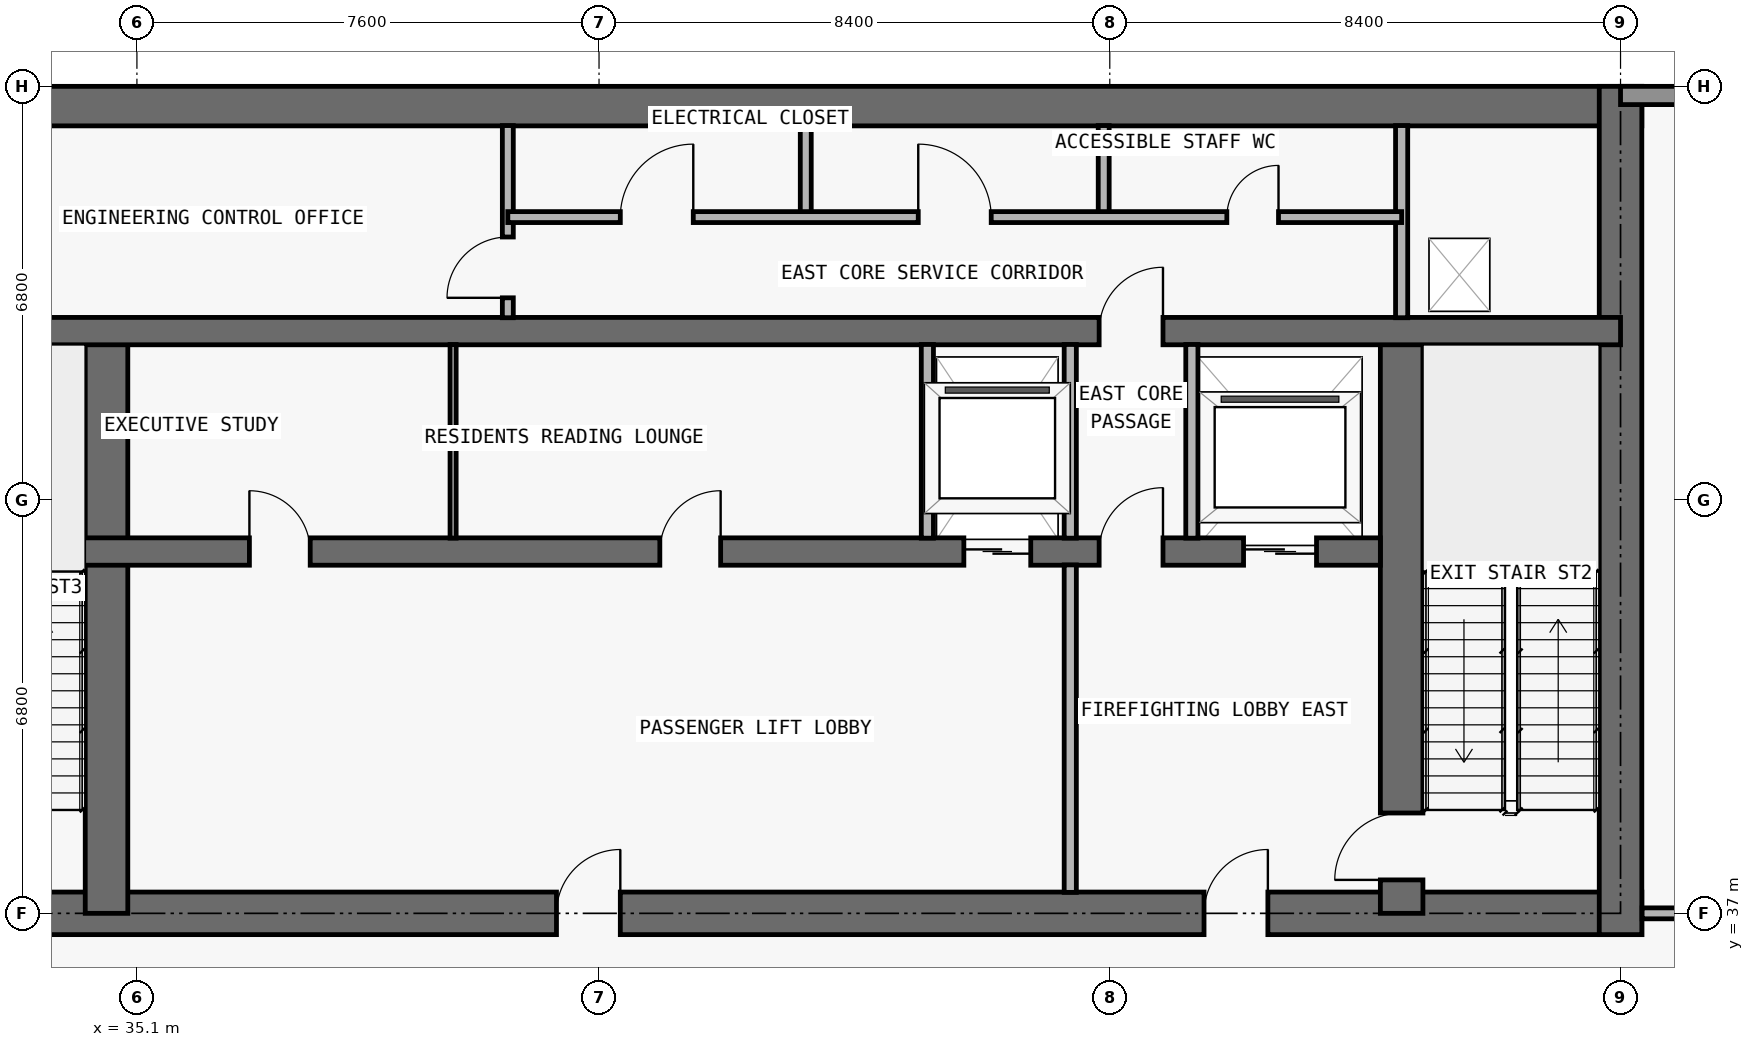
"""IFC4 building model, lengths in metres.
Left out: names, types, materials, properties, quantities, classifications, styles, units other than length and angle.
Written with IfcOpenShell. Run it as: python <this file> out.ifc"""

import sys

from ifc_helpers import new_model, si_unit, direction, frame, frame_2d, origin, place, context, subcontext, project, spatial, rectangle, extrude, element, fill, save


model = new_model("IFC4")
c1 = context("Model", 3, precision=1e-05, world=origin(), true_north=direction((0.0, 1.0)))
c2 = subcontext(c1, "Body", "Model", "MODEL_VIEW")
j1 = project(units=[si_unit("LENGTHUNIT", "METRE"), si_unit("PLANEANGLEUNIT", "RADIAN")], contexts=[c1])
p1 = place(None, origin())
s1 = spatial("IfcSite", under=j1, at=p1, CompositionType="ELEMENT")
p2 = place(p1, origin())
s2 = spatial("IfcBuilding", under=s1, at=p2, CompositionType="ELEMENT")
p3 = place(p2, frame((0.0, 0.0, 221.4)))
s3 = spatial("IfcBuildingStorey", under=s2, at=p3, CompositionType="ELEMENT", Elevation=221.4)
p4 = place(p3, frame((17.95, 37.0, 0.0), z_axis=(0.0, 0.0, 1.0), x_axis=(1.0, 0.0, 0.0)))
e1 = element("IfcWall", 1, at=p4, inside=s3, PredefinedType="SHEAR", context=c2, shape_type="SweptSolid", body=[
    extrude(rectangle(XDim=41.9, YDim=0.7, at=frame_2d((20.95, 0.0))), origin(), (0.0, 0.0, 1.0), 4.85),
])
p5 = place(p4, frame((14.35, 0.0, 0.0)))
e2 = element("IfcOpeningElement", 2, at=p5, cuts=e1, PredefinedType="OPENING", context=c2, shape_type="SweptSolid", body=[
    extrude(rectangle(XDim=1.1, YDim=2.15, at=frame_2d((0.55, 1.075))), frame((0.0, 0.36, 0.0), z_axis=(0.0, -1.0, 0.0), x_axis=(1.0, 0.0, 0.0)), (0.0, 0.0, 1.0), 0.72),
])
p6 = place(p4, frame((6.2, 0.0, 0.0)))
e3 = element("IfcOpeningElement", 3, at=p6, cuts=e1, PredefinedType="OPENING", context=c2, shape_type="SweptSolid", body=[
    extrude(rectangle(XDim=1.05, YDim=2.15, at=frame_2d((0.525, 1.075))), frame((0.0, 0.36, 0.0), z_axis=(0.0, -1.0, 0.0), x_axis=(1.0, 0.0, 0.0)), (0.0, 0.0, 1.0), 0.72),
])
p7 = place(p4, frame((34.7, 0.0, 0.0)))
e4 = element("IfcOpeningElement", 4, at=p7, cuts=e1, PredefinedType="OPENING", context=c2, shape_type="SweptSolid", body=[
    extrude(rectangle(XDim=1.05, YDim=2.15, at=frame_2d((0.525, 1.075))), frame((0.0, 0.36, 0.0), z_axis=(0.0, -1.0, 0.0), x_axis=(1.0, 0.0, 0.0)), (0.0, 0.0, 1.0), 0.72),
])
p8 = place(p4, frame((10.812, 0.0, 0.0)))
e5 = element("IfcOpeningElement", 5, at=p8, cuts=e1, PredefinedType="OPENING", context=c2, shape_type="SweptSolid", body=[
    extrude(rectangle(XDim=1.05, YDim=2.15, at=frame_2d((0.525, 1.075))), frame((0.0, 0.36, 0.0), z_axis=(0.0, -1.0, 0.0), x_axis=(1.0, 0.0, 0.0)), (0.0, 0.0, 1.0), 0.72),
])
p9 = place(p4, frame((24.05, 0.0, 0.0)))
e6 = element("IfcOpeningElement", 6, at=p9, cuts=e1, PredefinedType="OPENING", context=c2, shape_type="SweptSolid", body=[
    extrude(rectangle(XDim=1.05, YDim=2.15, at=frame_2d((0.525, 1.075))), frame((0.0, 0.36, 0.0), z_axis=(0.0, -1.0, 0.0), x_axis=(1.0, 0.0, 0.0)), (0.0, 0.0, 1.0), 0.72),
])
p10 = place(p3, frame((17.95, 50.275, 0.0), z_axis=(0.0, 0.0, 1.0), x_axis=(1.0, 0.0, 0.0)))
e7 = element("IfcWall", 7, at=p10, inside=s3, PredefinedType="SHEAR", context=c2, shape_type="SweptSolid", body=[
    extrude(rectangle(XDim=41.9, YDim=0.65, at=frame_2d((20.95, 0.0))), origin(), (0.0, 0.0, 1.0), 4.85),
])
p11 = place(p3, frame((59.5, 36.65, 0.0), z_axis=(0.0, 0.0, 1.0), x_axis=(0.0, 1.0, 0.0)))
e8 = element("IfcWall", 8, at=p11, inside=s3, PredefinedType="SHEAR", context=c2, shape_type="SweptSolid", body=[
    extrude(rectangle(XDim=13.95, YDim=0.7, at=frame_2d((6.975, 0.0))), origin(), (0.0, 0.0, 1.0), 4.85),
])
p12 = place(p3, frame((55.9, 37.0, 0.0), z_axis=(0.0, 0.0, 1.0), x_axis=(0.0, 1.0, 0.0)))
e9 = element("IfcWall", 9, at=p12, inside=s3, PredefinedType="SHEAR", context=c2, shape_type="SweptSolid", body=[
    extrude(rectangle(XDim=9.575, YDim=0.7, at=frame_2d((4.788, 0.0))), origin(), (0.0, 0.0, 1.0), 4.85),
])
p13 = place(p12, frame((0.55, 0.0, 0.0)))
e10 = element("IfcOpeningElement", 10, at=p13, cuts=e9, PredefinedType="OPENING", context=c2, shape_type="SweptSolid", body=[
    extrude(rectangle(XDim=1.1, YDim=2.15, at=frame_2d((0.55, 1.075))), frame((0.0, 0.36, 0.0), z_axis=(0.0, -1.0, 0.0), x_axis=(1.0, 0.0, 0.0)), (0.0, 0.0, 1.0), 0.72),
])
p14 = place(p3, frame((34.6, 37.0, 0.0), z_axis=(0.0, 0.0, 1.0), x_axis=(0.0, 1.0, 0.0)))
e11 = element("IfcWall", 11, at=p14, inside=s3, PredefinedType="SHEAR", context=c2, shape_type="SweptSolid", body=[
    extrude(rectangle(XDim=9.575, YDim=0.7, at=frame_2d((4.788, 0.0))), origin(), (0.0, 0.0, 1.0), 4.85),
])
p15 = place(p3, frame((22.25, 42.95, 0.0), z_axis=(0.0, 0.0, 1.0), x_axis=(1.0, 0.0, 0.0)))
e12 = element("IfcWall", 12, at=p15, inside=s3, PredefinedType="SHEAR", context=c2, shape_type="SweptSolid", body=[
    extrude(rectangle(XDim=33.3, YDim=0.45, at=frame_2d((16.65, 0.0))), origin(), (0.0, 0.0, 1.0), 4.85),
])
p16 = place(p15, frame((1.05, 0.0, 0.0)))
e13 = element("IfcOpeningElement", 13, at=p16, cuts=e12, PredefinedType="OPENING", context=c2, shape_type="SweptSolid", body=[
    extrude(rectangle(XDim=1.2, YDim=2.2, at=frame_2d((0.6, 1.1))), frame((0.0, 0.235, 0.0), z_axis=(0.0, -1.0, 0.0), x_axis=(1.0, 0.0, 0.0)), (0.0, 0.0, 1.0), 0.47),
])
p17 = place(p15, frame((31.05, 0.0, 0.0)))
e14 = element("IfcOpeningElement", 14, at=p17, cuts=e12, PredefinedType="OPENING", context=c2, shape_type="SweptSolid", body=[
    extrude(rectangle(XDim=1.2, YDim=2.2, at=frame_2d((0.6, 1.1))), frame((0.0, 0.235, 0.0), z_axis=(0.0, -1.0, 0.0), x_axis=(1.0, 0.0, 0.0)), (0.0, 0.0, 1.0), 0.47),
])
p18 = place(p15, frame((26.45, 0.0, 0.0)))
e15 = element("IfcOpeningElement", 15, at=p18, cuts=e12, PredefinedType="OPENING", context=c2, shape_type="SweptSolid", body=[
    extrude(rectangle(XDim=1.1, YDim=2.2, at=frame_2d((0.55, 1.1))), frame((0.0, 0.235, 0.0), z_axis=(0.0, -1.0, 0.0), x_axis=(1.0, 0.0, 0.0)), (0.0, 0.0, 1.0), 0.47),
])
p19 = place(p15, frame((5.95, 0.0, 0.0)))
e16 = element("IfcOpeningElement", 16, at=p19, cuts=e12, PredefinedType="OPENING", context=c2, shape_type="SweptSolid", body=[
    extrude(rectangle(XDim=1.1, YDim=2.2, at=frame_2d((0.55, 1.1))), frame((0.0, 0.235, 0.0), z_axis=(0.0, -1.0, 0.0), x_axis=(1.0, 0.0, 0.0)), (0.0, 0.0, 1.0), 0.47),
])
p20 = place(p15, frame((3.625, 0.0, 0.0)))
e17 = element("IfcOpeningElement", 17, at=p20, cuts=e12, PredefinedType="OPENING", context=c2, shape_type="SweptSolid", body=[
    extrude(rectangle(XDim=1.05, YDim=2.15, at=frame_2d((0.525, 1.075))), frame((0.0, 0.235, 0.0), z_axis=(0.0, -1.0, 0.0), x_axis=(1.0, 0.0, 0.0)), (0.0, 0.0, 1.0), 0.47),
])
p21 = place(p15, frame((28.675, 0.0, 0.0)))
e18 = element("IfcOpeningElement", 18, at=p21, cuts=e12, PredefinedType="OPENING", context=c2, shape_type="SweptSolid", body=[
    extrude(rectangle(XDim=1.05, YDim=2.15, at=frame_2d((0.525, 1.075))), frame((0.0, 0.235, 0.0), z_axis=(0.0, -1.0, 0.0), x_axis=(1.0, 0.0, 0.0)), (0.0, 0.0, 1.0), 0.47),
])
p22 = place(p15, frame((14.7, 0.0, 0.0)))
e19 = element("IfcOpeningElement", 19, at=p22, cuts=e12, PredefinedType="OPENING", context=c2, shape_type="SweptSolid", body=[
    extrude(rectangle(XDim=1.0, YDim=2.2, at=frame_2d((0.5, 1.1))), frame((0.0, 0.235, 0.0), z_axis=(0.0, -1.0, 0.0), x_axis=(1.0, 0.0, 0.0)), (0.0, 0.0, 1.0), 0.47),
])
p23 = place(p15, frame((21.45, 0.0, 0.0)))
e20 = element("IfcOpeningElement", 20, at=p23, cuts=e12, PredefinedType="OPENING", context=c2, shape_type="SweptSolid", body=[
    extrude(rectangle(XDim=1.0, YDim=2.2, at=frame_2d((0.5, 1.1))), frame((0.0, 0.235, 0.0), z_axis=(0.0, -1.0, 0.0), x_axis=(1.0, 0.0, 0.0)), (0.0, 0.0, 1.0), 0.47),
])
p24 = place(p3, frame((18.3, 46.575, 0.0), z_axis=(0.0, 0.0, 1.0), x_axis=(1.0, 0.0, 0.0)))
e21 = element("IfcWall", 21, at=p24, inside=s3, PredefinedType="SHEAR", context=c2, shape_type="SweptSolid", body=[
    extrude(rectangle(XDim=41.2, YDim=0.45, at=frame_2d((20.6, 0.0))), origin(), (0.0, 0.0, 1.0), 4.85),
])
p25 = place(p24, frame((7.6, 0.0, 0.0)))
e22 = element("IfcOpeningElement", 22, at=p25, cuts=e21, PredefinedType="OPENING", context=c2, shape_type="SweptSolid", body=[
    extrude(rectangle(XDim=1.0, YDim=2.2, at=frame_2d((0.5, 1.1))), frame((0.0, 0.235, 0.0), z_axis=(0.0, -1.0, 0.0), x_axis=(1.0, 0.0, 0.0)), (0.0, 0.0, 1.0), 0.47),
])
p26 = place(p24, frame((32.625, 0.0, 0.0)))
e23 = element("IfcOpeningElement", 23, at=p26, cuts=e21, PredefinedType="OPENING", context=c2, shape_type="SweptSolid", body=[
    extrude(rectangle(XDim=1.05, YDim=2.15, at=frame_2d((0.525, 1.075))), frame((0.0, 0.235, 0.0), z_axis=(0.0, -1.0, 0.0), x_axis=(1.0, 0.0, 0.0)), (0.0, 0.0, 1.0), 0.47),
])
p27 = place(p3, frame((59.5, 50.45, 0.0), z_axis=(0.0, 0.0, 1.0), x_axis=(1.0, 0.0, 0.0)))
e24 = element("IfcWall", 24, at=p27, inside=s3, PredefinedType="STANDARD", context=c2, shape_type="SweptSolid", body=[
    extrude(rectangle(XDim=8.2, YDim=0.3, at=frame_2d((4.1, 0.0))), origin(), (0.0, 0.0, 1.0), 4.85),
])
p28 = place(p27, frame((3.0, 0.0, 0.85)))
e25 = element("IfcOpeningElement", 25, at=p28, cuts=e24, PredefinedType="OPENING", context=c2, shape_type="SweptSolid", body=[
    extrude(rectangle(XDim=2.2, YDim=1.55, at=frame_2d((1.1, 0.775))), frame((0.0, 0.16, 0.0), z_axis=(0.0, -1.0, 0.0), x_axis=(1.0, 0.0, 0.0)), (0.0, 0.0, 1.0), 0.32),
])
p29 = place(p3, frame((40.3, 43.17, 0.0), z_axis=(0.0, 0.0, 1.0), x_axis=(0.0, 1.0, 0.0)))
e26 = element("IfcWall", 26, at=p29, inside=s3, PredefinedType="MOVABLE", context=c2, shape_type="SweptSolid", body=[
    extrude(rectangle(XDim=3.185, YDim=0.1, at=frame_2d((1.593, 0.0))), origin(), (0.0, 0.0, 1.0), 4.85),
])
p30 = place(p3, frame((41.2, 46.795, 0.0), z_axis=(0.0, 0.0, 1.0), x_axis=(0.0, 1.0, 0.0)))
e27 = element("IfcWall", 27, at=p30, inside=s3, PredefinedType="PARTITIONING", context=c2, shape_type="SweptSolid", body=[
    extrude(rectangle(XDim=3.16, YDim=0.18, at=frame_2d((1.58, 0.0))), origin(), (0.0, 0.0, 1.0), 4.85),
])
p31 = place(p30, frame((0.327, 0.0, 0.0)))
e28 = element("IfcOpeningElement", 28, at=p31, cuts=e27, PredefinedType="OPENING", context=c2, shape_type="SweptSolid", body=[
    extrude(rectangle(XDim=1.0, YDim=2.2, at=frame_2d((0.5, 1.1))), frame((0.0, 0.1, 0.0), z_axis=(0.0, -1.0, 0.0), x_axis=(1.0, 0.0, 0.0)), (0.0, 0.0, 1.0), 0.2),
])
p32 = place(p3, frame((46.1, 48.45, 0.0), z_axis=(0.0, 0.0, 1.0), x_axis=(0.0, 1.0, 0.0)))
e29 = element("IfcWall", 29, at=p32, inside=s3, PredefinedType="PARTITIONING", context=c2, shape_type="SweptSolid", body=[
    extrude(rectangle(XDim=1.505, YDim=0.18, at=frame_2d((0.752, 0.0))), origin(), (0.0, 0.0, 1.0), 4.85),
])
p33 = place(p3, frame((48.1, 43.17, 0.0), z_axis=(0.0, 0.0, 1.0), x_axis=(0.0, 1.0, 0.0)))
e30 = element("IfcWall", 30, at=p33, inside=s3, PredefinedType="PARTITIONING", context=c2, shape_type="SweptSolid", body=[
    extrude(rectangle(XDim=3.185, YDim=0.2, at=frame_2d((1.593, 0.0))), origin(), (0.0, 0.0, 1.0), 4.85),
])
p34 = place(p3, frame((50.45, 37.345, 0.0), z_axis=(0.0, 0.0, 1.0), x_axis=(0.0, 1.0, 0.0)))
e31 = element("IfcWall", 31, at=p34, inside=s3, PredefinedType="PARTITIONING", context=c2, shape_type="SweptSolid", body=[
    extrude(rectangle(XDim=5.385, YDim=0.2, at=frame_2d((2.692, 0.0))), origin(), (0.0, 0.0, 1.0), 4.85),
])
p35 = place(p3, frame((50.45, 43.17, 0.0), z_axis=(0.0, 0.0, 1.0), x_axis=(0.0, 1.0, 0.0)))
e32 = element("IfcWall", 32, at=p35, inside=s3, PredefinedType="PARTITIONING", context=c2, shape_type="SweptSolid", body=[
    extrude(rectangle(XDim=3.185, YDim=0.2, at=frame_2d((1.593, 0.0))), origin(), (0.0, 0.0, 1.0), 4.85),
])
p36 = place(p3, frame((51.0, 48.45, 0.0), z_axis=(0.0, 0.0, 1.0), x_axis=(0.0, 1.0, 0.0)))
e33 = element("IfcWall", 33, at=p36, inside=s3, PredefinedType="PARTITIONING", context=c2, shape_type="SweptSolid", body=[
    extrude(rectangle(XDim=1.505, YDim=0.18, at=frame_2d((0.752, 0.0))), origin(), (0.0, 0.0, 1.0), 4.85),
])
p37 = place(p3, frame((52.45, 43.17, 0.0), z_axis=(0.0, 0.0, 1.0), x_axis=(0.0, 1.0, 0.0)))
e34 = element("IfcWall", 34, at=p37, inside=s3, PredefinedType="PARTITIONING", context=c2, shape_type="SweptSolid", body=[
    extrude(rectangle(XDim=3.185, YDim=0.2, at=frame_2d((1.593, 0.0))), origin(), (0.0, 0.0, 1.0), 4.85),
])
p38 = place(p3, frame((55.9, 46.795, 0.0), z_axis=(0.0, 0.0, 1.0), x_axis=(0.0, 1.0, 0.0)))
e35 = element("IfcWall", 35, at=p38, inside=s3, PredefinedType="PARTITIONING", context=c2, shape_type="SweptSolid", body=[
    extrude(rectangle(XDim=3.16, YDim=0.2, at=frame_2d((1.58, 0.0))), origin(), (0.0, 0.0, 1.0), 4.85),
])
p39 = place(p3, frame((59.855, 37.0, 0.0), z_axis=(0.0, 0.0, 1.0), x_axis=(1.0, 0.0, 0.0)))
e36 = element("IfcWall", 36, at=p39, inside=s3, PredefinedType="PARTITIONING", context=c2, shape_type="SweptSolid", body=[
    extrude(rectangle(XDim=7.845, YDim=0.18, at=frame_2d((3.922, 0.0))), origin(), (0.0, 0.0, 1.0), 4.85),
])
p40 = place(p39, frame((3.323, 0.0, 0.0)))
e37 = element("IfcOpeningElement", 37, at=p40, cuts=e36, PredefinedType="OPENING", context=c2, shape_type="SweptSolid", body=[
    extrude(rectangle(XDim=1.2, YDim=2.2, at=frame_2d((0.6, 1.1))), frame((0.0, 0.1, 0.0), z_axis=(0.0, -1.0, 0.0), x_axis=(1.0, 0.0, 0.0)), (0.0, 0.0, 1.0), 0.2),
])
p41 = place(p3, frame((41.2, 48.45, 0.0), z_axis=(0.0, 0.0, 1.0), x_axis=(1.0, 0.0, 0.0)))
e38 = element("IfcWall", 38, at=p41, inside=s3, PredefinedType="PARTITIONING", context=c2, shape_type="SweptSolid", body=[
    extrude(rectangle(XDim=14.7, YDim=0.18, at=frame_2d((7.35, 0.0))), origin(), (0.0, 0.0, 1.0), 4.85),
])
p42 = place(p41, frame((1.85, 0.0, 0.0)))
e39 = element("IfcOpeningElement", 39, at=p42, cuts=e38, PredefinedType="OPENING", context=c2, shape_type="SweptSolid", body=[
    extrude(rectangle(XDim=1.2, YDim=2.2, at=frame_2d((0.6, 1.1))), frame((0.0, 0.1, 0.0), z_axis=(0.0, -1.0, 0.0), x_axis=(1.0, 0.0, 0.0)), (0.0, 0.0, 1.0), 0.2),
])
p43 = place(p41, frame((6.75, 0.0, 0.0)))
e40 = element("IfcOpeningElement", 40, at=p43, cuts=e38, PredefinedType="OPENING", context=c2, shape_type="SweptSolid", body=[
    extrude(rectangle(XDim=1.2, YDim=2.2, at=frame_2d((0.6, 1.1))), frame((0.0, 0.1, 0.0), z_axis=(0.0, -1.0, 0.0), x_axis=(1.0, 0.0, 0.0)), (0.0, 0.0, 1.0), 0.2),
])
p44 = place(p41, frame((11.825, 0.0, 0.0)))
e41 = element("IfcOpeningElement", 41, at=p44, cuts=e38, PredefinedType="OPENING", context=c2, shape_type="SweptSolid", body=[
    extrude(rectangle(XDim=0.85, YDim=2.1, at=frame_2d((0.425, 1.05))), frame((0.0, 0.1, 0.0), z_axis=(0.0, -1.0, 0.0), x_axis=(1.0, 0.0, 0.0)), (0.0, 0.0, 1.0), 0.2),
])
p45 = place(p17, origin())
e42 = element("IfcDoor", 42, at=p45, inside=s3, OperationType="DOUBLE_DOOR_SLIDING", PredefinedType="DOOR", context=c2, shape_type="SweptSolid", body=[
    extrude(rectangle(XDim=1.2, YDim=2.2, at=frame_2d((0.6, 1.1))), frame((0.0, 0.025, 0.0), z_axis=(0.0, -1.0, 0.0), x_axis=(1.0, 0.0, 0.0)), (0.0, 0.0, 1.0), 0.05),
])
fill(e14, e42)
p46 = place(p18, origin())
e43 = element("IfcDoor", 43, at=p46, inside=s3, OperationType="DOUBLE_DOOR_SLIDING", PredefinedType="DOOR", context=c2, shape_type="SweptSolid", body=[
    extrude(rectangle(XDim=1.1, YDim=2.2, at=frame_2d((0.55, 1.1))), frame((0.0, 0.025, 0.0), z_axis=(0.0, -1.0, 0.0), x_axis=(1.0, 0.0, 0.0)), (0.0, 0.0, 1.0), 0.05),
])
fill(e15, e43)
p47 = place(p7, origin())
e44 = element("IfcDoor", 44, at=p47, inside=s3, OperationType="SINGLE_SWING_RIGHT", PredefinedType="DOOR", context=c2, shape_type="SweptSolid", body=[
    extrude(rectangle(XDim=1.05, YDim=2.15, at=frame_2d((0.525, 1.075))), frame((0.0, 0.025, 0.0), z_axis=(0.0, -1.0, 0.0), x_axis=(1.0, 0.0, 0.0)), (0.0, 0.0, 1.0), 0.05),
])
fill(e4, e44)
p48 = place(p13, origin())
e45 = element("IfcDoor", 45, at=p48, inside=s3, OperationType="SINGLE_SWING_LEFT", PredefinedType="DOOR", context=c2, shape_type="SweptSolid", body=[
    extrude(rectangle(XDim=1.1, YDim=2.15, at=frame_2d((0.55, 1.075))), frame((0.0, 0.025, 0.0), z_axis=(0.0, -1.0, 0.0), x_axis=(1.0, 0.0, 0.0)), (0.0, 0.0, 1.0), 0.05),
])
fill(e10, e45)
p49 = place(p21, origin())
e46 = element("IfcDoor", 46, at=p49, inside=s3, OperationType="SINGLE_SWING_RIGHT", PredefinedType="DOOR", context=c2, shape_type="SweptSolid", body=[
    extrude(rectangle(XDim=1.05, YDim=2.15, at=frame_2d((0.525, 1.075))), frame((0.0, 0.025, 0.0), z_axis=(0.0, -1.0, 0.0), x_axis=(1.0, 0.0, 0.0)), (0.0, 0.0, 1.0), 0.05),
])
fill(e18, e46)
p50 = place(p9, origin())
e47 = element("IfcDoor", 47, at=p50, inside=s3, OperationType="SINGLE_SWING_RIGHT", PredefinedType="DOOR", context=c2, shape_type="SweptSolid", body=[
    extrude(rectangle(XDim=1.05, YDim=2.15, at=frame_2d((0.525, 1.075))), frame((0.0, 0.025, 0.0), z_axis=(0.0, -1.0, 0.0), x_axis=(1.0, 0.0, 0.0)), (0.0, 0.0, 1.0), 0.05),
])
fill(e6, e47)
p51 = place(p22, origin())
e48 = element("IfcDoor", 48, at=p51, inside=s3, OperationType="SINGLE_SWING_LEFT", PredefinedType="DOOR", context=c2, shape_type="SweptSolid", body=[
    extrude(rectangle(XDim=1.0, YDim=2.2, at=frame_2d((0.5, 1.1))), frame((0.0, 0.025, 0.0), z_axis=(0.0, -1.0, 0.0), x_axis=(1.0, 0.0, 0.0)), (0.0, 0.0, 1.0), 0.05),
])
fill(e19, e48)
p52 = place(p23, origin())
e49 = element("IfcDoor", 49, at=p52, inside=s3, OperationType="SINGLE_SWING_RIGHT", PredefinedType="DOOR", context=c2, shape_type="SweptSolid", body=[
    extrude(rectangle(XDim=1.0, YDim=2.2, at=frame_2d((0.5, 1.1))), frame((0.0, 0.025, 0.0), z_axis=(0.0, -1.0, 0.0), x_axis=(1.0, 0.0, 0.0)), (0.0, 0.0, 1.0), 0.05),
])
fill(e20, e49)
p53 = place(p26, origin())
e50 = element("IfcDoor", 50, at=p53, inside=s3, OperationType="SINGLE_SWING_RIGHT", PredefinedType="DOOR", context=c2, shape_type="SweptSolid", body=[
    extrude(rectangle(XDim=1.05, YDim=2.15, at=frame_2d((0.525, 1.075))), frame((0.0, 0.025, 0.0), z_axis=(0.0, -1.0, 0.0), x_axis=(1.0, 0.0, 0.0)), (0.0, 0.0, 1.0), 0.05),
])
fill(e23, e50)
p54 = place(p31, origin())
e51 = element("IfcDoor", 51, at=p54, inside=s3, OperationType="SINGLE_SWING_LEFT", PredefinedType="DOOR", context=c2, shape_type="SweptSolid", body=[
    extrude(rectangle(XDim=1.0, YDim=2.2, at=frame_2d((0.5, 1.1))), frame((0.0, 0.025, 0.0), z_axis=(0.0, -1.0, 0.0), x_axis=(1.0, 0.0, 0.0)), (0.0, 0.0, 1.0), 0.05),
])
fill(e28, e51)
p55 = place(p42, origin())
e52 = element("IfcDoor", 52, at=p55, inside=s3, OperationType="SINGLE_SWING_RIGHT", PredefinedType="DOOR", context=c2, shape_type="SweptSolid", body=[
    extrude(rectangle(XDim=1.2, YDim=2.2, at=frame_2d((0.6, 1.1))), frame((0.0, 0.025, 0.0), z_axis=(0.0, -1.0, 0.0), x_axis=(1.0, 0.0, 0.0)), (0.0, 0.0, 1.0), 0.05),
])
fill(e39, e52)
p56 = place(p43, origin())
e53 = element("IfcDoor", 53, at=p56, inside=s3, OperationType="SINGLE_SWING_LEFT", PredefinedType="DOOR", context=c2, shape_type="SweptSolid", body=[
    extrude(rectangle(XDim=1.2, YDim=2.2, at=frame_2d((0.6, 1.1))), frame((0.0, 0.025, 0.0), z_axis=(0.0, -1.0, 0.0), x_axis=(1.0, 0.0, 0.0)), (0.0, 0.0, 1.0), 0.05),
])
fill(e40, e53)
p57 = place(p44, origin())
e54 = element("IfcDoor", 54, at=p57, inside=s3, OperationType="SINGLE_SWING_RIGHT", PredefinedType="DOOR", context=c2, shape_type="SweptSolid", body=[
    extrude(rectangle(XDim=0.85, YDim=2.1, at=frame_2d((0.425, 1.05))), frame((0.0, 0.025, 0.0), z_axis=(0.0, -1.0, 0.0), x_axis=(1.0, 0.0, 0.0)), (0.0, 0.0, 1.0), 0.05),
])
fill(e41, e54)
save(model, sys.argv[1])
